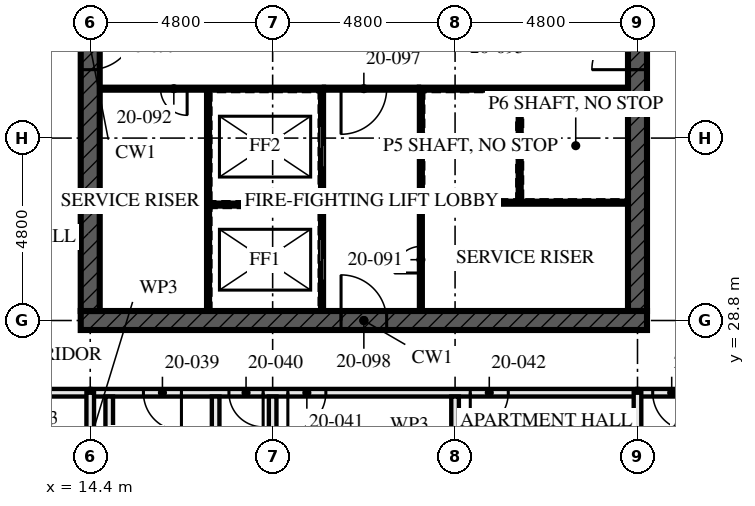
"""IFC4 building model, lengths in metres.
Left out: names, types, materials, properties, quantities, classifications, styles, units other than length and angle.
Written with IfcOpenShell. Run it as: python <this file> out.ifc"""

import sys

from ifc_helpers import new_model, si_unit, direction, frame, frame_2d, origin, place, context, subcontext, project, spatial, rectangle, extrude, element, fill, save


model = new_model("IFC4")
c1 = context("Model", 3, precision=1e-05, world=origin(), true_north=direction((0.0, 1.0)))
c2 = subcontext(c1, "Body", "Model", "MODEL_VIEW")
j1 = project(units=[si_unit("LENGTHUNIT", "METRE"), si_unit("PLANEANGLEUNIT", "RADIAN")], contexts=[c1])
p1 = place(None, origin())
s1 = spatial("IfcSite", under=j1, at=p1, CompositionType="ELEMENT")
p2 = place(p1, origin())
s2 = spatial("IfcBuilding", under=s1, at=p2, CompositionType="ELEMENT")
p3 = place(p2, frame((0.0, 0.0, 76.0)))
s3 = spatial("IfcBuildingStorey", under=s2, at=p3, CompositionType="ELEMENT", Elevation=76.0)
p4 = place(p3, frame((14.15, 28.8, -0.17), z_axis=(0.0, 0.0, 1.0), x_axis=(1.0, 0.0, 0.0)))
e1 = element("IfcWall", 1, at=p4, inside=s3, PredefinedType="SHEAR", context=c2, shape_type="SweptSolid", body=[
    extrude(rectangle(XDim=14.9, YDim=0.5, at=frame_2d((7.45, 0.0))), origin(), (0.0, 0.0, 1.0), 3.42),
])
p5 = place(p4, frame((6.85, 0.0, 0.17)))
e2 = element("IfcOpeningElement", 2, at=p5, cuts=e1, PredefinedType="OPENING", context=c2, shape_type="SweptSolid", body=[
    extrude(rectangle(XDim=1.2, YDim=2.1, at=frame_2d((0.6, 1.05))), frame((0.0, 0.26, 0.0), z_axis=(0.0, -1.0, 0.0), x_axis=(1.0, 0.0, 0.0)), (0.0, 0.0, 1.0), 0.521),
])
p6 = place(p3, frame((14.4, 42.95, -0.17), z_axis=(0.0, 0.0, 1.0), x_axis=(0.0, -1.0, 0.0)))
e3 = element("IfcWall", 3, at=p6, inside=s3, PredefinedType="SHEAR", context=c2, shape_type="SweptSolid", body=[
    extrude(rectangle(XDim=13.9, YDim=0.5, at=frame_2d((6.95, 0.0))), origin(), (0.0, 0.0, 1.0), 3.42),
])
p7 = place(p6, frame((6.35, 0.0, 0.17)))
e4 = element("IfcOpeningElement", 4, at=p7, cuts=e3, PredefinedType="OPENING", context=c2, shape_type="SweptSolid", body=[
    extrude(rectangle(XDim=1.2, YDim=2.1, at=frame_2d((0.6, 1.05))), frame((0.0, 0.26, 0.0), z_axis=(0.0, -1.0, 0.0), x_axis=(1.0, 0.0, 0.0)), (0.0, 0.0, 1.0), 0.521),
])
p8 = place(p3, frame((28.8, 29.05, -0.17), z_axis=(0.0, 0.0, 1.0), x_axis=(0.0, 1.0, 0.0)))
e5 = element("IfcWall", 5, at=p8, inside=s3, PredefinedType="SHEAR", context=c2, shape_type="SweptSolid", body=[
    extrude(rectangle(XDim=13.9, YDim=0.5, at=frame_2d((6.95, 0.0))), origin(), (0.0, 0.0, 1.0), 3.42),
])
p9 = place(p8, frame((6.35, 0.0, 0.17)))
e6 = element("IfcOpeningElement", 6, at=p9, cuts=e5, PredefinedType="OPENING", context=c2, shape_type="SweptSolid", body=[
    extrude(rectangle(XDim=1.2, YDim=2.1, at=frame_2d((0.6, 1.05))), frame((0.0, 0.26, 0.0), z_axis=(0.0, -1.0, 0.0), x_axis=(1.0, 0.0, 0.0)), (0.0, 0.0, 1.0), 0.521),
])
p10 = place(p3, frame((4.8, 26.9, 0.0), z_axis=(0.0, 0.0, 1.0), x_axis=(1.0, 0.0, 0.0)))
e7 = element("IfcWall", 7, at=p10, inside=s3, PredefinedType="PARTITIONING", context=c2, shape_type="SweptSolid", body=[
    extrude(rectangle(XDim=9.6, YDim=0.2, at=frame_2d((4.8, 0.0))), origin(), (0.0, 0.0, 1.0), 3.25),
])
p11 = place(p10, frame((0.4, 0.0, 0.0)))
e8 = element("IfcOpeningElement", 8, at=p11, cuts=e7, PredefinedType="OPENING", context=c2, shape_type="SweptSolid", body=[
    extrude(rectangle(XDim=1.0, YDim=2.1, at=frame_2d((0.5, 1.05))), frame((0.0, 0.111, 0.0), z_axis=(0.0, -1.0, 0.0), x_axis=(1.0, 0.0, 0.0)), (0.0, 0.0, 1.0), 0.221),
])
p12 = place(p10, frame((5.2, 0.0, 0.0)))
e9 = element("IfcOpeningElement", 9, at=p12, cuts=e7, PredefinedType="OPENING", context=c2, shape_type="SweptSolid", body=[
    extrude(rectangle(XDim=1.0, YDim=2.1, at=frame_2d((0.5, 1.05))), frame((0.0, 0.111, 0.0), z_axis=(0.0, -1.0, 0.0), x_axis=(1.0, 0.0, 0.0)), (0.0, 0.0, 1.0), 0.221),
])
for number, where, z_axis, x_axis in (
    (10, (14.9, 22.1, 0.0), (0.0, 0.0, 1.0), (0.0, 1.0, 0.0)),
    (11, (17.7, 22.1, 0.0), (0.0, 0.0, 1.0), (0.0, 1.0, 0.0)),
):
    element("IfcWall", number, at=place(p3, frame(where, z_axis=z_axis, x_axis=x_axis)), inside=s3, PredefinedType="SOLIDWALL", context=c2, shape_type="SweptSolid", body=[
        extrude(rectangle(XDim=4.7, YDim=0.2, at=frame_2d((2.35, 0.0))), origin(), (0.0, 0.0, 1.0), 2.94),
    ])
for number, where, z_axis, x_axis in (
    (12, (19.2, 14.72, 0.0), (0.0, 0.0, 1.0), (0.0, 1.0, 0.0)),
    (13, (24.0, 14.72, 0.0), (0.0, 0.0, 1.0), (0.0, 1.0, 0.0)),
):
    element("IfcWall", number, at=place(p3, frame(where, z_axis=z_axis, x_axis=x_axis)), inside=s3, PredefinedType="PARTITIONING", context=c2, shape_type="SweptSolid", body=[
        extrude(rectangle(XDim=12.08, YDim=0.2, at=frame_2d((6.04, 0.0))), origin(), (0.0, 0.0, 1.0), 2.04),
    ])
p13 = place(p3, frame((14.4, 26.9, 0.0), z_axis=(0.0, 0.0, 1.0), x_axis=(1.0, 0.0, 0.0)))
e14 = element("IfcWall", 14, at=p13, inside=s3, PredefinedType="PARTITIONING", context=c2, shape_type="SweptSolid", body=[
    extrude(rectangle(XDim=14.4, YDim=0.2, at=frame_2d((7.2, 0.0))), origin(), (0.0, 0.0, 1.0), 2.04),
])
p14 = place(p13, frame((1.4, 0.0, 0.0)))
e15 = element("IfcOpeningElement", 15, at=p14, cuts=e14, PredefinedType="OPENING", context=c2, shape_type="SweptSolid", body=[
    extrude(rectangle(XDim=1.0, YDim=2.0, at=frame_2d((0.5, 1.0))), frame((0.0, 0.111, 0.0), z_axis=(0.0, -1.0, 0.0), x_axis=(1.0, 0.0, 0.0)), (0.0, 0.0, 1.0), 0.221),
])
p15 = place(p13, frame((3.65, 0.0, 0.0)))
e16 = element("IfcOpeningElement", 16, at=p15, cuts=e14, PredefinedType="OPENING", context=c2, shape_type="SweptSolid", body=[
    extrude(rectangle(XDim=0.9, YDim=2.0, at=frame_2d((0.45, 1.0))), frame((0.0, 0.111, 0.0), z_axis=(0.0, -1.0, 0.0), x_axis=(1.0, 0.0, 0.0)), (0.0, 0.0, 1.0), 0.221),
])
p16 = place(p13, frame((5.2, 0.0, 0.0)))
e17 = element("IfcOpeningElement", 17, at=p16, cuts=e14, PredefinedType="OPENING", context=c2, shape_type="SweptSolid", body=[
    extrude(rectangle(XDim=1.0, YDim=2.0, at=frame_2d((0.5, 1.0))), frame((0.0, 0.111, 0.0), z_axis=(0.0, -1.0, 0.0), x_axis=(1.0, 0.0, 0.0)), (0.0, 0.0, 1.0), 0.221),
])
p17 = place(p13, frame((10.0, 0.0, 0.0)))
e18 = element("IfcOpeningElement", 18, at=p17, cuts=e14, PredefinedType="OPENING", context=c2, shape_type="SweptSolid", body=[
    extrude(rectangle(XDim=1.0, YDim=2.0, at=frame_2d((0.5, 1.0))), frame((0.0, 0.111, 0.0), z_axis=(0.0, -1.0, 0.0), x_axis=(1.0, 0.0, 0.0)), (0.0, 0.0, 1.0), 0.221),
])
p18 = place(p3, frame((28.8, 26.9, 0.0), z_axis=(0.0, 0.0, 1.0), x_axis=(1.0, 0.0, 0.0)))
e19 = element("IfcWall", 19, at=p18, inside=s3, PredefinedType="PARTITIONING", context=c2, shape_type="SweptSolid", body=[
    extrude(rectangle(XDim=9.6, YDim=0.2, at=frame_2d((4.8, 0.0))), origin(), (0.0, 0.0, 1.0), 3.25),
])
p19 = place(p18, frame((0.4, 0.0, 0.0)))
e20 = element("IfcOpeningElement", 20, at=p19, cuts=e19, PredefinedType="OPENING", context=c2, shape_type="SweptSolid", body=[
    extrude(rectangle(XDim=1.0, YDim=2.1, at=frame_2d((0.5, 1.05))), frame((0.0, 0.111, 0.0), z_axis=(0.0, -1.0, 0.0), x_axis=(1.0, 0.0, 0.0)), (0.0, 0.0, 1.0), 0.221),
])
p20 = place(p18, frame((5.2, 0.0, 0.0)))
e21 = element("IfcOpeningElement", 21, at=p20, cuts=e19, PredefinedType="OPENING", context=c2, shape_type="SweptSolid", body=[
    extrude(rectangle(XDim=1.0, YDim=2.1, at=frame_2d((0.5, 1.05))), frame((0.0, 0.111, 0.0), z_axis=(0.0, -1.0, 0.0), x_axis=(1.0, 0.0, 0.0)), (0.0, 0.0, 1.0), 0.221),
])
p21 = place(p3, frame((20.5, 29.05, 0.0), z_axis=(0.0, 0.0, 1.0), x_axis=(0.0, 1.0, 0.0)))
e22 = element("IfcWall", 22, at=p21, inside=s3, PredefinedType="SOLIDWALL", context=c2, shape_type="SweptSolid", body=[
    extrude(rectangle(XDim=5.8, YDim=0.1, at=frame_2d((2.9, 0.0))), origin(), (0.0, 0.0, 1.0), 3.25),
])
p22 = place(p21, frame((0.8, 0.0, 0.0)))
e23 = element("IfcOpeningElement", 23, at=p22, cuts=e22, PredefinedType="OPENING", context=c2, shape_type="SweptSolid", body=[
    extrude(rectangle(XDim=1.1, YDim=2.3, at=frame_2d((0.55, 1.15))), frame((0.0, 0.061, 0.0), z_axis=(0.0, -1.0, 0.0), x_axis=(1.0, 0.0, 0.0)), (0.0, 0.0, 1.0), 0.121),
])
p23 = place(p21, frame((3.775, 0.0, 0.0)))
e24 = element("IfcOpeningElement", 24, at=p23, cuts=e22, PredefinedType="OPENING", context=c2, shape_type="SweptSolid", body=[
    extrude(rectangle(XDim=1.1, YDim=2.3, at=frame_2d((0.55, 1.15))), frame((0.0, 0.061, 0.0), z_axis=(0.0, -1.0, 0.0), x_axis=(1.0, 0.0, 0.0)), (0.0, 0.0, 1.0), 0.121),
])
p24 = place(p3, frame((23.1, 29.05, 0.0), z_axis=(0.0, 0.0, 1.0), x_axis=(0.0, 1.0, 0.0)))
e25 = element("IfcWall", 25, at=p24, inside=s3, PredefinedType="SOLIDWALL", context=c2, shape_type="SweptSolid", body=[
    extrude(rectangle(XDim=5.8, YDim=0.1, at=frame_2d((2.9, 0.0))), origin(), (0.0, 0.0, 1.0), 3.25),
])
p25 = place(p24, frame((1.0, 0.0, 0.0)))
e26 = element("IfcOpeningElement", 26, at=p25, cuts=e25, PredefinedType="OPENING", context=c2, shape_type="SweptSolid", body=[
    extrude(rectangle(XDim=0.7, YDim=2.1, at=frame_2d((0.35, 1.05))), frame((0.0, 0.061, 0.0), z_axis=(0.0, -1.0, 0.0), x_axis=(1.0, 0.0, 0.0)), (0.0, 0.0, 1.0), 0.121),
])
p26 = place(p3, frame((14.65, 34.9, 0.0), z_axis=(0.0, 0.0, 1.0), x_axis=(1.0, 0.0, 0.0)))
e27 = element("IfcWall", 27, at=p26, inside=s3, PredefinedType="SOLIDWALL", context=c2, shape_type="SweptSolid", body=[
    extrude(rectangle(XDim=5.9, YDim=0.1, at=frame_2d((2.95, 0.0))), origin(), (0.0, 0.0, 1.0), 3.25),
])
p27 = place(p26, frame((1.6, 0.0, 0.0)))
e28 = element("IfcOpeningElement", 28, at=p27, cuts=e27, PredefinedType="OPENING", context=c2, shape_type="SweptSolid", body=[
    extrude(rectangle(XDim=0.7, YDim=2.1, at=frame_2d((0.35, 1.05))), frame((0.0, 0.061, 0.0), z_axis=(0.0, -1.0, 0.0), x_axis=(1.0, 0.0, 0.0)), (0.0, 0.0, 1.0), 0.121),
])
p28 = place(p3, frame((23.05, 34.9, 0.0), z_axis=(0.0, 0.0, 1.0), x_axis=(1.0, 0.0, 0.0)))
e29 = element("IfcWall", 29, at=p28, inside=s3, PredefinedType="SOLIDWALL", context=c2, shape_type="SweptSolid", body=[
    extrude(rectangle(XDim=5.5, YDim=0.1, at=frame_2d((2.75, 0.0))), origin(), (0.0, 0.0, 1.0), 3.25),
])
p29 = place(p3, frame((20.55, 34.9, 0.0), z_axis=(0.0, 0.0, 1.0), x_axis=(1.0, 0.0, 0.0)))
e30 = element("IfcWall", 30, at=p29, inside=s3, PredefinedType="SOLIDWALL", context=c2, shape_type="SweptSolid", body=[
    extrude(rectangle(XDim=2.5, YDim=0.1, at=frame_2d((1.25, 0.0))), origin(), (0.0, 0.0, 1.0), 3.25),
])
p30 = place(p29, frame((0.45, 0.0, 0.0)))
e31 = element("IfcOpeningElement", 31, at=p30, cuts=e30, PredefinedType="OPENING", context=c2, shape_type="SweptSolid", body=[
    extrude(rectangle(XDim=1.2, YDim=2.1, at=frame_2d((0.6, 1.05))), frame((0.0, 0.061, 0.0), z_axis=(0.0, -1.0, 0.0), x_axis=(1.0, 0.0, 0.0)), (0.0, 0.0, 1.0), 0.121),
])
p31 = place(p3, frame((17.5, 29.05, 0.0), z_axis=(0.0, 0.0, 1.0), x_axis=(0.0, 1.0, 0.0)))
e32 = element("IfcWall", 32, at=p31, inside=s3, PredefinedType="SOLIDWALL", context=c2, shape_type="SweptSolid", body=[
    extrude(rectangle(XDim=5.8, YDim=0.1, at=frame_2d((2.9, 0.0))), origin(), (0.0, 0.0, 1.0), 3.25),
])
p32 = place(p3, frame((17.55, 31.85, 0.0), z_axis=(0.0, 0.0, 1.0), x_axis=(1.0, 0.0, 0.0)))
e33 = element("IfcWall", 33, at=p32, inside=s3, PredefinedType="SOLIDWALL", context=c2, shape_type="SweptSolid", body=[
    extrude(rectangle(XDim=2.9, YDim=0.1, at=frame_2d((1.45, 0.0))), origin(), (0.0, 0.0, 1.0), 3.25),
])
p33 = place(p3, frame((25.7, 31.95, 0.0), z_axis=(0.0, 0.0, 1.0), x_axis=(0.0, 1.0, 0.0)))
e34 = element("IfcWall", 34, at=p33, inside=s3, PredefinedType="SOLIDWALL", context=c2, shape_type="SweptSolid", body=[
    extrude(rectangle(XDim=2.9, YDim=0.1, at=frame_2d((1.45, 0.0))), origin(), (0.0, 0.0, 1.0), 3.25),
])
p34 = place(p3, frame((23.15, 31.9, 0.0), z_axis=(0.0, 0.0, 1.0), x_axis=(1.0, 0.0, 0.0)))
e35 = element("IfcWall", 35, at=p34, inside=s3, PredefinedType="SOLIDWALL", context=c2, shape_type="SweptSolid", body=[
    extrude(rectangle(XDim=5.4, YDim=0.1, at=frame_2d((2.7, 0.0))), origin(), (0.0, 0.0, 1.0), 3.25),
])
for number, where, z_axis, x_axis in (
    (36, (14.4, 24.395, 0.0), (0.0, 0.0, 1.0), (0.0, 1.0, 0.0)),
    (37, (28.8, 24.395, 0.0), (0.0, 0.0, 1.0), (0.0, 1.0, 0.0)),
):
    element("IfcWall", number, at=place(p3, frame(where, z_axis=z_axis, x_axis=x_axis)), inside=s3, PredefinedType="PARTITIONING", context=c2, shape_type="SweptSolid", body=[
        extrude(rectangle(XDim=2.505, YDim=0.2, at=frame_2d((1.252, 0.0))), origin(), (0.0, 0.0, 1.0), 2.04),
    ])
p35 = place(p14, frame((1.0, 0.0, 0.0), z_axis=(0.0, 0.0, 1.0), x_axis=(-1.0, 0.0, 0.0)))
e38 = element("IfcDoor", 38, at=p35, inside=s3, OperationType="SINGLE_SWING_RIGHT", PredefinedType="DOOR", context=c2, shape_type="SweptSolid", body=[
    extrude(rectangle(XDim=1.0, YDim=2.0, at=frame_2d((0.5, 1.0))), frame((0.0, 0.032, 0.0), z_axis=(0.0, -1.0, 0.0), x_axis=(1.0, 0.0, 0.0)), (0.0, 0.0, 1.0), 0.064),
])
fill(e15, e38)
p36 = place(p15, frame((0.9, 0.0, 0.0), z_axis=(0.0, 0.0, 1.0), x_axis=(-1.0, 0.0, 0.0)))
e39 = element("IfcDoor", 39, at=p36, inside=s3, OperationType="SINGLE_SWING_RIGHT", PredefinedType="DOOR", context=c2, shape_type="SweptSolid", body=[
    extrude(rectangle(XDim=0.9, YDim=2.0, at=frame_2d((0.45, 1.0))), frame((0.0, 0.027, 0.0), z_axis=(0.0, -1.0, 0.0), x_axis=(1.0, 0.0, 0.0)), (0.0, 0.0, 1.0), 0.054),
])
fill(e16, e39)
p37 = place(p16, frame((1.0, 0.0, 0.0), z_axis=(0.0, 0.0, 1.0), x_axis=(-1.0, 0.0, 0.0)))
e40 = element("IfcDoor", 40, at=p37, inside=s3, OperationType="SINGLE_SWING_LEFT", PredefinedType="DOOR", context=c2, shape_type="SweptSolid", body=[
    extrude(rectangle(XDim=1.0, YDim=2.0, at=frame_2d((0.5, 1.0))), frame((0.0, 0.027, 0.0), z_axis=(0.0, -1.0, 0.0), x_axis=(1.0, 0.0, 0.0)), (0.0, 0.0, 1.0), 0.054),
])
fill(e17, e40)
p38 = place(p17, frame((1.0, 0.0, 0.0), z_axis=(0.0, 0.0, 1.0), x_axis=(-1.0, 0.0, 0.0)))
e41 = element("IfcDoor", 41, at=p38, inside=s3, OperationType="SINGLE_SWING_LEFT", PredefinedType="DOOR", context=c2, shape_type="SweptSolid", body=[
    extrude(rectangle(XDim=1.0, YDim=2.0, at=frame_2d((0.5, 1.0))), frame((0.0, 0.027, 0.0), z_axis=(0.0, -1.0, 0.0), x_axis=(1.0, 0.0, 0.0)), (0.0, 0.0, 1.0), 0.054),
])
fill(e18, e41)
p39 = place(p19, frame((1.0, 0.0, 0.0), z_axis=(0.0, 0.0, 1.0), x_axis=(-1.0, 0.0, 0.0)))
e42 = element("IfcDoor", 42, at=p39, inside=s3, OperationType="SINGLE_SWING_RIGHT", PredefinedType="DOOR", context=c2, shape_type="SweptSolid", body=[
    extrude(rectangle(XDim=1.0, YDim=2.1, at=frame_2d((0.5, 1.05))), frame((0.0, 0.027, 0.0), z_axis=(0.0, -1.0, 0.0), x_axis=(1.0, 0.0, 0.0)), (0.0, 0.0, 1.0), 0.054),
])
fill(e20, e42)
p40 = place(p22, origin())
e43 = element("IfcDoor", 43, at=p40, inside=s3, OperationType="SLIDING_TO_LEFT", PredefinedType="DOOR", context=c2, shape_type="SweptSolid", body=[
    extrude(rectangle(XDim=1.1, YDim=2.3, at=frame_2d((0.55, 1.15))), frame((0.0, 0.05, 0.0), z_axis=(0.0, -1.0, 0.0), x_axis=(1.0, 0.0, 0.0)), (0.0, 0.0, 1.0), 0.1),
])
fill(e23, e43)
p41 = place(p23, origin())
e44 = element("IfcDoor", 44, at=p41, inside=s3, OperationType="SLIDING_TO_LEFT", PredefinedType="DOOR", context=c2, shape_type="SweptSolid", body=[
    extrude(rectangle(XDim=1.1, YDim=2.3, at=frame_2d((0.55, 1.15))), frame((0.0, 0.05, 0.0), z_axis=(0.0, -1.0, 0.0), x_axis=(1.0, 0.0, 0.0)), (0.0, 0.0, 1.0), 0.1),
])
fill(e24, e44)
p42 = place(p25, origin())
e45 = element("IfcDoor", 45, at=p42, inside=s3, OperationType="SINGLE_SWING_RIGHT", PredefinedType="DOOR", context=c2, shape_type="SweptSolid", body=[
    extrude(rectangle(XDim=0.7, YDim=2.1, at=frame_2d((0.35, 1.05))), frame((0.0, 0.027, 0.0), z_axis=(0.0, -1.0, 0.0), x_axis=(1.0, 0.0, 0.0)), (0.0, 0.0, 1.0), 0.054),
])
fill(e26, e45)
p43 = place(p27, frame((0.7, 0.0, 0.0), z_axis=(0.0, 0.0, 1.0), x_axis=(-1.0, 0.0, 0.0)))
e46 = element("IfcDoor", 46, at=p43, inside=s3, OperationType="SINGLE_SWING_RIGHT", PredefinedType="DOOR", context=c2, shape_type="SweptSolid", body=[
    extrude(rectangle(XDim=0.7, YDim=2.1, at=frame_2d((0.35, 1.05))), frame((0.0, 0.027, 0.0), z_axis=(0.0, -1.0, 0.0), x_axis=(1.0, 0.0, 0.0)), (0.0, 0.0, 1.0), 0.054),
])
fill(e28, e46)
p44 = place(p30, frame((1.2, 0.0, 0.0), z_axis=(0.0, 0.0, 1.0), x_axis=(-1.0, 0.0, 0.0)))
e47 = element("IfcDoor", 47, at=p44, inside=s3, OperationType="SINGLE_SWING_LEFT", PredefinedType="DOOR", context=c2, shape_type="SweptSolid", body=[
    extrude(rectangle(XDim=1.2, YDim=2.1, at=frame_2d((0.6, 1.05))), frame((0.0, 0.027, 0.0), z_axis=(0.0, -1.0, 0.0), x_axis=(1.0, 0.0, 0.0)), (0.0, 0.0, 1.0), 0.054),
])
fill(e31, e47)
p45 = place(p5, origin())
e48 = element("IfcDoor", 48, at=p45, inside=s3, OperationType="SINGLE_SWING_LEFT", PredefinedType="DOOR", context=c2, shape_type="SweptSolid", body=[
    extrude(rectangle(XDim=1.2, YDim=2.1, at=frame_2d((0.6, 1.05))), frame((0.0, 0.027, 0.0), z_axis=(0.0, -1.0, 0.0), x_axis=(1.0, 0.0, 0.0)), (0.0, 0.0, 1.0), 0.054),
])
fill(e2, e48)
p46 = place(p7, origin())
e49 = element("IfcDoor", 49, at=p46, inside=s3, OperationType="SINGLE_SWING_LEFT", PredefinedType="DOOR", context=c2, shape_type="SweptSolid", body=[
    extrude(rectangle(XDim=1.2, YDim=2.1, at=frame_2d((0.6, 1.05))), frame((0.0, 0.027, 0.0), z_axis=(0.0, -1.0, 0.0), x_axis=(1.0, 0.0, 0.0)), (0.0, 0.0, 1.0), 0.054),
])
fill(e4, e49)
p47 = place(p9, origin())
e50 = element("IfcDoor", 50, at=p47, inside=s3, OperationType="SINGLE_SWING_LEFT", PredefinedType="DOOR", context=c2, shape_type="SweptSolid", body=[
    extrude(rectangle(XDim=1.2, YDim=2.1, at=frame_2d((0.6, 1.05))), frame((0.0, 0.027, 0.0), z_axis=(0.0, -1.0, 0.0), x_axis=(1.0, 0.0, 0.0)), (0.0, 0.0, 1.0), 0.054),
])
fill(e6, e50)
save(model, sys.argv[1])
